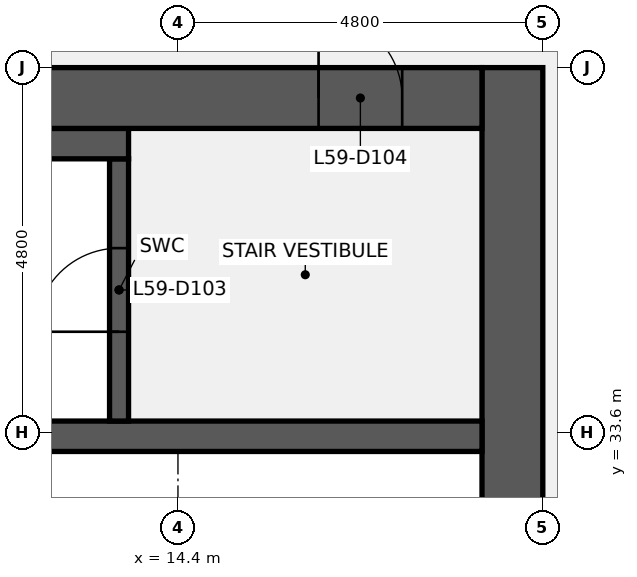
"""IFC4 building model, lengths in metres.
Left out: names, types, materials, properties, quantities, classifications, styles, units other than length and angle.
Written with IfcOpenShell. Run it as: python <this file> out.ifc"""

import sys

from ifc_helpers import new_model, si_unit, direction, frame, frame_2d, origin, place, context, subcontext, project, spatial, rectangle, extrude, element, fill, save


model = new_model("IFC4")
c1 = context("Model", 3, precision=1e-05, world=origin(), true_north=direction((0.0, 1.0)))
c2 = subcontext(c1, "Body", "Model", "MODEL_VIEW")
j1 = project(units=[si_unit("LENGTHUNIT", "METRE"), si_unit("PLANEANGLEUNIT", "RADIAN")], contexts=[c1])
p1 = place(None, origin())
s1 = spatial("IfcSite", under=j1, at=p1, CompositionType="ELEMENT")
p2 = place(p1, origin())
s2 = spatial("IfcBuilding", under=s1, at=p2, CompositionType="ELEMENT")
p3 = place(p2, frame((0.0, 0.0, 265.2)))
s3 = spatial("IfcBuildingStorey", under=s2, at=p3, CompositionType="ELEMENT", Elevation=265.2)
p4 = place(p3, frame((18.8, 38.4, 0.0), z_axis=(0.0, 0.0, 1.0), x_axis=(0.0, -1.0, 0.0)))
e1 = element("IfcWall", 1, at=p4, inside=s3, PredefinedType="SHEAR", context=c2, shape_type="SweptSolid", body=[
    extrude(rectangle(XDim=28.8, YDim=0.8, at=frame_2d((14.4, 0.0))), origin(), (0.0, 0.0, 1.0), 4.1),
])
p5 = place(p4, frame((18.3, 0.0, 0.0)))
e2 = element("IfcOpeningElement", 2, at=p5, cuts=e1, PredefinedType="OPENING", context=c2, shape_type="SweptSolid", body=[
    extrude(rectangle(XDim=1.8, YDim=2.1, at=frame_2d((0.9, 1.05))), frame((0.0, 0.41, 0.0), z_axis=(0.0, -1.0, 0.0), x_axis=(1.0, 0.0, 0.0)), (0.0, 0.0, 1.0), 0.82),
])
p6 = place(p4, frame((8.7, 0.0, 0.0)))
e3 = element("IfcOpeningElement", 3, at=p6, cuts=e1, PredefinedType="OPENING", context=c2, shape_type="SweptSolid", body=[
    extrude(rectangle(XDim=1.8, YDim=2.1, at=frame_2d((0.9, 1.05))), frame((0.0, 0.41, 0.0), z_axis=(0.0, -1.0, 0.0), x_axis=(1.0, 0.0, 0.0)), (0.0, 0.0, 1.0), 0.82),
])
p7 = place(p3, frame((0.8, 33.55, 0.0), z_axis=(0.0, 0.0, 1.0), x_axis=(1.0, 0.0, 0.0)))
e4 = element("IfcWall", 4, at=p7, inside=s3, PredefinedType="SHEAR", context=c2, shape_type="SweptSolid", body=[
    extrude(rectangle(XDim=17.6, YDim=0.4, at=frame_2d((8.8, 0.0))), origin(), (0.0, 0.0, 1.0), 4.1),
])
p8 = place(p3, frame((13.625, 33.75, 0.0), z_axis=(0.0, 0.0, 1.0), x_axis=(0.0, 1.0, 0.0)))
e5 = element("IfcWall", 5, at=p8, inside=s3, PredefinedType="SHEAR", context=c2, shape_type="SweptSolid", body=[
    extrude(rectangle(XDim=3.45, YDim=0.25, at=frame_2d((1.725, 0.0))), origin(), (0.0, 0.0, 1.0), 4.1),
])
p9 = place(p8, frame((1.175, 0.0, 0.0)))
e6 = element("IfcOpeningElement", 6, at=p9, cuts=e5, PredefinedType="OPENING", context=c2, shape_type="SweptSolid", body=[
    extrude(rectangle(XDim=1.1, YDim=2.1, at=frame_2d((0.55, 1.05))), frame((0.0, 0.135, 0.0), z_axis=(0.0, -1.0, 0.0), x_axis=(1.0, 0.0, 0.0)), (0.0, 0.0, 1.0), 0.27),
])
p10 = place(p3, frame((9.6, 37.4, 0.0), z_axis=(0.0, 0.0, 1.0), x_axis=(1.0, 0.0, 0.0)))
e7 = element("IfcWall", 7, at=p10, inside=s3, PredefinedType="SHEAR", context=c2, shape_type="SweptSolid", body=[
    extrude(rectangle(XDim=4.15, YDim=0.4, at=frame_2d((2.075, 0.0))), origin(), (0.0, 0.0, 1.0), 4.1),
])
p11 = place(p3, frame((9.6, 38.0, 0.0), z_axis=(0.0, 0.0, 1.0), x_axis=(1.0, 0.0, 0.0)))
e8 = element("IfcWall", 8, at=p11, inside=s3, PredefinedType="SHEAR", context=c2, shape_type="SweptSolid", body=[
    extrude(rectangle(XDim=8.8, YDim=0.8, at=frame_2d((4.4, 0.0))), origin(), (0.0, 0.0, 1.0), 4.1),
])
p12 = place(p11, frame((6.65, 0.0, 0.0)))
e9 = element("IfcOpeningElement", 9, at=p12, cuts=e8, PredefinedType="OPENING", context=c2, shape_type="SweptSolid", body=[
    extrude(rectangle(XDim=1.1, YDim=2.1, at=frame_2d((0.55, 1.05))), frame((0.0, 0.41, 0.0), z_axis=(0.0, -1.0, 0.0), x_axis=(1.0, 0.0, 0.0)), (0.0, 0.0, 1.0), 0.82),
])
p13 = place(p9, origin())
e10 = element("IfcDoor", 10, at=p13, inside=s3, OperationType="SINGLE_SWING_LEFT", PredefinedType="DOOR", context=c2, shape_type="SweptSolid", body=[
    extrude(rectangle(XDim=1.1, YDim=2.1, at=frame_2d((0.55, 1.05))), frame((0.0, 0.025, 0.0), z_axis=(0.0, -1.0, 0.0), x_axis=(1.0, 0.0, 0.0)), (0.0, 0.0, 1.0), 0.05),
])
fill(e6, e10)
p14 = place(p12, origin())
e11 = element("IfcDoor", 11, at=p14, inside=s3, OperationType="SINGLE_SWING_LEFT", PredefinedType="DOOR", context=c2, shape_type="SweptSolid", body=[
    extrude(rectangle(XDim=1.1, YDim=2.1, at=frame_2d((0.55, 1.05))), frame((0.0, 0.025, 0.0), z_axis=(0.0, -1.0, 0.0), x_axis=(1.0, 0.0, 0.0)), (0.0, 0.0, 1.0), 0.05),
])
fill(e9, e11)
save(model, sys.argv[1])
